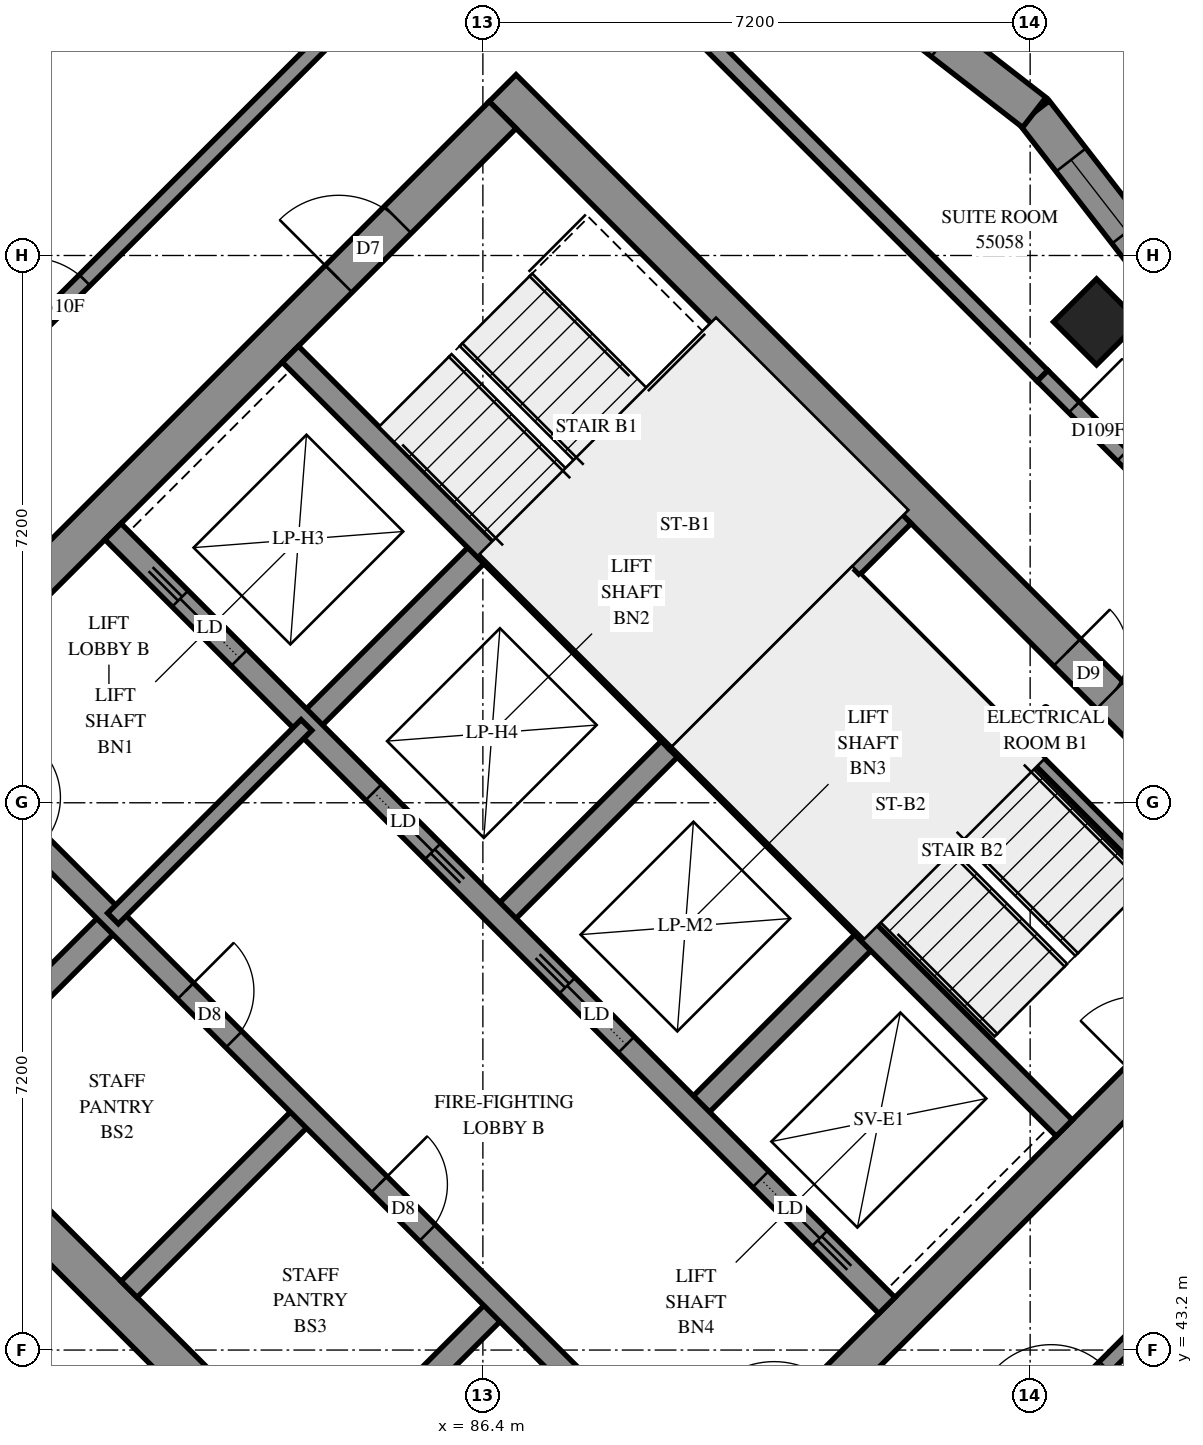
"""IFC4 building model, lengths in metres.
Left out: names, types, materials, properties, quantities, classifications, styles, units other than length and angle.
Written with IfcOpenShell. Run it as: python <this file> out.ifc"""

import sys

from ifc_helpers import new_model, si_unit, direction, frame, frame_2d, origin, origin_2d, place, context, subcontext, project, spatial, polyline, rectangle, outline, extrude, element, fill, save


model = new_model("IFC4")
c1 = context("Model", 3, precision=1e-05, world=origin(), true_north=direction((0.0, 1.0)))
c2 = subcontext(c1, "Body", "Model", "MODEL_VIEW")
j1 = project(units=[si_unit("LENGTHUNIT", "METRE"), si_unit("PLANEANGLEUNIT", "RADIAN")], contexts=[c1])
p1 = place(None, origin())
s1 = spatial("IfcSite", under=j1, at=p1, CompositionType="ELEMENT")
p2 = place(p1, origin())
s2 = spatial("IfcBuilding", under=s1, at=p2, CompositionType="ELEMENT")
p3 = place(p2, frame((0.0, 0.0, 203.2)))
s3 = spatial("IfcBuildingStorey", under=s2, at=p3, CompositionType="ELEMENT", Elevation=203.2)
p4 = place(p3, frame((94.474, 56.727, 0.0), z_axis=(0.0, 0.0, 1.0), x_axis=(0.7071067812, -0.7071067812, 0.0)))
e1 = element("IfcColumn", 1, at=p4, inside=s3, PredefinedType="COLUMN", context=c2, shape_type="SweptSolid", body=[
    extrude(rectangle(XDim=0.8, YDim=0.8, at=origin_2d()), origin(), (0.0, 0.0, 1.0), 3.1),
])
p5 = place(p3, frame((76.124, 49.267, -0.3), z_axis=(0.0, 0.0, 1.0), x_axis=(0.7071067812, -0.7071067812, 0.0)))
e2 = element("IfcWall", 2, at=p5, inside=s3, PredefinedType="SHEAR", context=c2, shape_type="SweptSolid", body=[
    extrude(rectangle(XDim=15.4, YDim=0.5, at=frame_2d((7.7, 0.0))), origin(), (0.0, 0.0, 1.0), 2.7),
])
p6 = place(p3, frame((86.66, 59.802, -0.3), z_axis=(0.0, 0.0, 1.0), x_axis=(0.7071067812, -0.7071067812, 0.0)))
e3 = element("IfcWall", 3, at=p6, inside=s3, PredefinedType="SHEAR", context=c2, shape_type="SweptSolid", body=[
    extrude(rectangle(XDim=15.4, YDim=0.5, at=frame_2d((7.7, 0.0))), origin(), (0.0, 0.0, 1.0), 2.7),
])
p7 = place(p6, frame((10.5, 0.0, 0.3)))
e4 = element("IfcOpeningElement", 4, at=p7, cuts=e3, PredefinedType="OPENING", context=c2, shape_type="SweptSolid", body=[
    extrude(rectangle(XDim=0.8, YDim=2.1, at=frame_2d((0.4, 1.05))), frame((0.0, 0.26, 0.0), z_axis=(0.0, -1.0, 0.0), x_axis=(1.0, 0.0, 0.0)), (0.0, 0.0, 1.0), 0.52),
])
p8 = place(p3, frame((76.478, 49.267, -0.3), z_axis=(0.0, 0.0, 1.0), x_axis=(0.7071067812, 0.7071067812, 0.0)))
e5 = element("IfcWall", 5, at=p8, inside=s3, PredefinedType="SHEAR", context=c2, shape_type="SweptSolid", body=[
    extrude(rectangle(XDim=14.4, YDim=0.5, at=frame_2d((7.2, 0.0))), origin(), (0.0, 0.0, 1.0), 2.7),
])
p9 = place(p8, frame((4.55, 0.0, 0.3)))
e6 = element("IfcOpeningElement", 6, at=p9, cuts=e5, PredefinedType="OPENING", context=c2, shape_type="SweptSolid", body=[
    extrude(rectangle(XDim=1.1, YDim=2.1, at=frame_2d((0.55, 1.05))), frame((0.0, 0.26, 0.0), z_axis=(0.0, -1.0, 0.0), x_axis=(1.0, 0.0, 0.0)), (0.0, 0.0, 1.0), 0.52),
])
p10 = place(p8, frame((11.35, 0.0, 0.3)))
e7 = element("IfcOpeningElement", 7, at=p10, cuts=e5, PredefinedType="OPENING", context=c2, shape_type="SweptSolid", body=[
    extrude(rectangle(XDim=1.1, YDim=2.1, at=frame_2d((0.55, 1.05))), frame((0.0, 0.26, 0.0), z_axis=(0.0, -1.0, 0.0), x_axis=(1.0, 0.0, 0.0)), (0.0, 0.0, 1.0), 0.52),
])
p11 = place(p3, frame((87.013, 38.731, -0.3), z_axis=(0.0, 0.0, 1.0), x_axis=(0.7071067812, 0.7071067812, 0.0)))
e8 = element("IfcWall", 8, at=p11, inside=s3, PredefinedType="SHEAR", context=c2, shape_type="SweptSolid", body=[
    extrude(rectangle(XDim=14.4, YDim=0.5, at=frame_2d((7.2, 0.0))), origin(), (0.0, 0.0, 1.0), 2.7),
])
p12 = place(p11, frame((4.55, 0.0, 0.3)))
e9 = element("IfcOpeningElement", 9, at=p12, cuts=e8, PredefinedType="OPENING", context=c2, shape_type="SweptSolid", body=[
    extrude(rectangle(XDim=1.1, YDim=2.1, at=frame_2d((0.55, 1.05))), frame((0.0, 0.26, 0.0), z_axis=(0.0, -1.0, 0.0), x_axis=(1.0, 0.0, 0.0)), (0.0, 0.0, 1.0), 0.52),
])
p13 = place(p11, frame((11.35, 0.0, 0.3)))
e10 = element("IfcOpeningElement", 10, at=p13, cuts=e8, PredefinedType="OPENING", context=c2, shape_type="SweptSolid", body=[
    extrude(rectangle(XDim=1.1, YDim=2.1, at=frame_2d((0.55, 1.05))), frame((0.0, 0.26, 0.0), z_axis=(0.0, -1.0, 0.0), x_axis=(1.0, 0.0, 0.0)), (0.0, 0.0, 1.0), 0.52),
])
for number, where, z_axis, x_axis in (
    (11, (79.2, 46.544, 0.0), (0.0, 0.0, 1.0), (0.707, 0.707, 0.0)),
    (12, (84.079, 51.423, 0.0), (0.0, 0.0, 1.0), (0.707, 0.707, 0.0)),
):
    element("IfcWall", number, at=place(p3, frame(where, z_axis=z_axis, x_axis=x_axis)), inside=s3, PredefinedType="SOLIDWALL", context=c2, shape_type="SweptSolid", body=[
        extrude(rectangle(XDim=3.3, YDim=0.3, at=frame_2d((1.65, 0.0))), origin(), (0.0, 0.0, 1.0), 3.1),
    ])
p14 = place(p3, frame((81.746, 43.999, 0.0), z_axis=(0.0, 0.0, 1.0), x_axis=(0.7071067812, 0.7071067812, 0.0)))
e13 = element("IfcWall", 13, at=p14, inside=s3, PredefinedType="SOLIDWALL", context=c2, shape_type="SweptSolid", body=[
    extrude(rectangle(XDim=3.3, YDim=0.3, at=frame_2d((1.65, 0.0))), origin(), (0.0, 0.0, 1.0), 3.1),
])
p15 = place(p3, frame((86.625, 48.878, 0.0), z_axis=(0.0, 0.0, 1.0), x_axis=(0.7071067812, 0.7071067812, 0.0)))
e14 = element("IfcWall", 14, at=p15, inside=s3, PredefinedType="SOLIDWALL", context=c2, shape_type="SweptSolid", body=[
    extrude(rectangle(XDim=3.3, YDim=0.3, at=frame_2d((1.65, 0.0))), origin(), (0.0, 0.0, 1.0), 3.1),
])
p16 = place(p3, frame((84.291, 41.453, 0.0), z_axis=(0.0, 0.0, 1.0), x_axis=(0.7071067812, 0.7071067812, 0.0)))
e15 = element("IfcWall", 15, at=p16, inside=s3, PredefinedType="SOLIDWALL", context=c2, shape_type="SweptSolid", body=[
    extrude(rectangle(XDim=3.3, YDim=0.3, at=frame_2d((1.65, 0.0))), origin(), (0.0, 0.0, 1.0), 3.1),
])
p17 = place(p3, frame((89.17, 46.332, 0.0), z_axis=(0.0, 0.0, 1.0), x_axis=(0.7071067812, 0.7071067812, 0.0)))
e16 = element("IfcWall", 16, at=p17, inside=s3, PredefinedType="SOLIDWALL", context=c2, shape_type="SweptSolid", body=[
    extrude(rectangle(XDim=3.3, YDim=0.3, at=frame_2d((1.65, 0.0))), origin(), (0.0, 0.0, 1.0), 3.1),
])
p18 = place(p3, frame((78.988, 51.423, 0.0), z_axis=(0.0, 0.0, 1.0), x_axis=(0.7071067812, -0.7071067812, 0.0)))
e17 = element("IfcWall", 17, at=p18, inside=s3, PredefinedType="SOLIDWALL", context=c2, shape_type="SweptSolid", body=[
    extrude(rectangle(XDim=14.4, YDim=0.3, at=frame_2d((7.2, 0.0))), origin(), (0.0, 0.0, 1.0), 3.1),
])
p19 = place(p18, frame((1.35, 0.0, 0.0)))
e18 = element("IfcOpeningElement", 18, at=p19, cuts=e17, PredefinedType="OPENING", context=c2, shape_type="SweptSolid", body=[
    extrude(rectangle(XDim=0.9, YDim=2.1, at=frame_2d((0.45, 1.05))), frame((0.0, 0.16, 0.0), z_axis=(0.0, -1.0, 0.0), x_axis=(1.0, 0.0, 0.0)), (0.0, 0.0, 1.0), 0.32),
])
p20 = place(p18, frame((4.95, 0.0, 0.0)))
e19 = element("IfcOpeningElement", 19, at=p20, cuts=e17, PredefinedType="OPENING", context=c2, shape_type="SweptSolid", body=[
    extrude(rectangle(XDim=0.9, YDim=2.1, at=frame_2d((0.45, 1.05))), frame((0.0, 0.16, 0.0), z_axis=(0.0, -1.0, 0.0), x_axis=(1.0, 0.0, 0.0)), (0.0, 0.0, 1.0), 0.32),
])
p21 = place(p18, frame((8.55, 0.0, 0.0)))
e20 = element("IfcOpeningElement", 20, at=p21, cuts=e17, PredefinedType="OPENING", context=c2, shape_type="SweptSolid", body=[
    extrude(rectangle(XDim=0.9, YDim=2.1, at=frame_2d((0.45, 1.05))), frame((0.0, 0.16, 0.0), z_axis=(0.0, -1.0, 0.0), x_axis=(1.0, 0.0, 0.0)), (0.0, 0.0, 1.0), 0.32),
])
p22 = place(p18, frame((12.05, 0.0, 0.0)))
e21 = element("IfcOpeningElement", 21, at=p22, cuts=e17, PredefinedType="OPENING", context=c2, shape_type="SweptSolid", body=[
    extrude(rectangle(XDim=1.1, YDim=2.1, at=frame_2d((0.55, 1.05))), frame((0.0, 0.16, 0.0), z_axis=(0.0, -1.0, 0.0), x_axis=(1.0, 0.0, 0.0)), (0.0, 0.0, 1.0), 0.32),
])
p23 = place(p3, frame((81.534, 53.969, 0.0), z_axis=(0.0, 0.0, 1.0), x_axis=(0.707103309, -0.7071102534, 0.0)))
e22 = element("IfcWall", 22, at=p23, inside=s3, PredefinedType="SOLIDWALL", context=c2, shape_type="SweptSolid", body=[
    extrude(rectangle(XDim=14.4, YDim=0.3, at=frame_2d((7.2, 0.0))), origin(), (0.0, 0.0, 1.0), 3.1),
])
p24 = place(p23, frame((1.25, 0.0, 0.0)))
e23 = element("IfcOpeningElement", 23, at=p24, cuts=e22, PredefinedType="OPENING", context=c2, shape_type="SweptSolid", body=[
    extrude(rectangle(XDim=1.1, YDim=2.1, at=frame_2d((0.55, 1.05))), frame((0.0, 0.16, 0.0), z_axis=(0.0, -1.0, 0.0), x_axis=(1.0, 0.0, 0.0)), (0.0, 0.0, 1.0), 0.32),
])
p25 = place(p23, frame((4.85, 0.0, 0.0)))
e24 = element("IfcOpeningElement", 24, at=p25, cuts=e22, PredefinedType="OPENING", context=c2, shape_type="SweptSolid", body=[
    extrude(rectangle(XDim=1.1, YDim=2.1, at=frame_2d((0.55, 1.05))), frame((0.0, 0.16, 0.0), z_axis=(0.0, -1.0, 0.0), x_axis=(1.0, 0.0, 0.0)), (0.0, 0.0, 1.0), 0.32),
])
p26 = place(p23, frame((8.45, 0.0, 0.0)))
e25 = element("IfcOpeningElement", 25, at=p26, cuts=e22, PredefinedType="OPENING", context=c2, shape_type="SweptSolid", body=[
    extrude(rectangle(XDim=1.1, YDim=2.1, at=frame_2d((0.55, 1.05))), frame((0.0, 0.16, 0.0), z_axis=(0.0, -1.0, 0.0), x_axis=(1.0, 0.0, 0.0)), (0.0, 0.0, 1.0), 0.32),
])
p27 = place(p23, frame((12.05, 0.0, 0.0)))
e26 = element("IfcOpeningElement", 26, at=p27, cuts=e22, PredefinedType="OPENING", context=c2, shape_type="SweptSolid", body=[
    extrude(rectangle(XDim=1.1, YDim=2.1, at=frame_2d((0.55, 1.05))), frame((0.0, 0.16, 0.0), z_axis=(0.0, -1.0, 0.0), x_axis=(1.0, 0.0, 0.0)), (0.0, 0.0, 1.0), 0.32),
])
for number, where, z_axis, x_axis in (
    (27, (83.867, 56.302, 0.0), (0.0, 0.0, 1.0), (0.707, -0.707, 0.0)),
    (28, (88.958, 51.211, 0.0), (0.0, 0.0, 1.0), (0.707, -0.707, 0.0)),
):
    element("IfcWall", number, at=place(p3, frame(where, z_axis=z_axis, x_axis=x_axis)), inside=s3, PredefinedType="SOLIDWALL", context=c2, shape_type="SweptSolid", body=[
        extrude(rectangle(XDim=7.2, YDim=0.3, at=frame_2d((3.6, 0.0))), origin(), (0.0, 0.0, 1.0), 3.1),
    ])
p28 = place(p3, frame((88.958, 51.211, 0.0), z_axis=(0.0, 0.0, 1.0), x_axis=(0.7071067812, 0.7071067812, 0.0)))
e29 = element("IfcWall", 29, at=p28, inside=s3, PredefinedType="SOLIDWALL", context=c2, shape_type="SweptSolid", body=[
    extrude(rectangle(XDim=4.2, YDim=0.3, at=frame_2d((2.1, 0.0))), origin(), (0.0, 0.0, 1.0), 3.1),
])
p29 = place(p3, frame((95.712, 56.828, 0.0), z_axis=(0.0, 0.0, 1.0), x_axis=(-0.6128887822, 0.7901691849, 0.0)))
e30 = element("IfcWall", 30, at=p29, inside=s3, PredefinedType="SOLIDWALL", context=c2, shape_type="SweptSolid", body=[
    extrude(outline(polyline([(0.032, -0.25), (3.39, -0.25), (3.327, 0.25), (-0.032, 0.25), (0.032, -0.25)])), origin(), (0.0, 0.0, 1.0), 3.1),
])
p30 = place(p29, frame((1.369, 0.0, 0.45)))
e31 = element("IfcOpeningElement", 31, at=p30, cuts=e30, PredefinedType="OPENING", context=c2, shape_type="SweptSolid", body=[
    extrude(rectangle(XDim=1.2, YDim=2.5, at=frame_2d((0.6, 1.25))), frame((0.0, 0.26, 0.0), z_axis=(0.0, -1.0, 0.0), x_axis=(1.0, 0.0, 0.0)), (0.0, 0.0, 1.0), 0.52),
])
p31 = place(p3, frame((93.654, 59.482, 0.0), z_axis=(0.0, 0.0, 1.0), x_axis=(-0.7901691849, 0.6128887822, 0.0)))
e32 = element("IfcWall", 32, at=p31, inside=s3, PredefinedType="SOLIDWALL", context=c2, shape_type="SweptSolid", body=[
    extrude(outline(polyline([(-0.032, -0.25), (3.327, -0.25), (3.39, 0.25), (0.032, 0.25), (-0.032, -0.25)])), origin(), (0.0, 0.0, 1.0), 3.1),
])
p32 = place(p31, frame((1.52, 0.0, 0.45)))
e33 = element("IfcOpeningElement", 33, at=p32, cuts=e32, PredefinedType="OPENING", context=c2, shape_type="SweptSolid", body=[
    extrude(rectangle(XDim=1.2, YDim=2.5, at=frame_2d((0.6, 1.25))), frame((0.0, 0.26, 0.0), z_axis=(0.0, -1.0, 0.0), x_axis=(1.0, 0.0, 0.0)), (0.0, 0.0, 1.0), 0.52),
])
p33 = place(p3, frame((91.313, 53.354, 0.0), z_axis=(0.0, 0.0, 1.0), x_axis=(0.7071067812, -0.7071067812, 0.0)))
e34 = element("IfcWall", 34, at=p33, inside=s3, PredefinedType="PARTITIONING", context=c2, shape_type="SweptSolid", body=[
    extrude(rectangle(XDim=5.95, YDim=0.15, at=frame_2d((2.975, 0.0))), origin(), (0.0, 0.0, 1.0), 3.1),
])
p34 = place(p3, frame((81.534, 48.878, 0.0), z_axis=(0.0, 0.0, 1.0), x_axis=(0.707092892, 0.7071206701, 0.0)))
e35 = element("IfcWall", 35, at=p34, inside=s3, PredefinedType="PARTITIONING", context=c2, shape_type="SweptSolid", body=[
    extrude(rectangle(XDim=3.6, YDim=0.2, at=frame_2d((1.8, 0.0))), origin(), (0.0, 0.0, 1.0), 3.1),
])
p35 = place(p3, frame((93.695, 42.091, 0.0), z_axis=(0.0, 0.0, 1.0), x_axis=(0.7071067812, 0.7071067812, 0.0)))
e36 = element("IfcWall", 36, at=p35, inside=s3, PredefinedType="PARTITIONING", context=c2, shape_type="SweptSolid", body=[
    extrude(rectangle(XDim=9.899, YDim=0.2, at=frame_2d((4.95, 0.0))), origin(), (0.0, 0.0, 1.0), 3.1),
])
p36 = place(p35, frame((0.255, 0.0, 0.0)))
e37 = element("IfcOpeningElement", 37, at=p36, cuts=e36, PredefinedType="OPENING", context=c2, shape_type="SweptSolid", body=[
    extrude(rectangle(XDim=1.0, YDim=2.1, at=frame_2d((0.5, 1.05))), frame((0.0, 0.11, 0.0), z_axis=(0.0, -1.0, 0.0), x_axis=(1.0, 0.0, 0.0)), (0.0, 0.0, 1.0), 0.22),
])
p37 = place(p3, frame((79.837, 55.951, 0.0), z_axis=(0.0, 0.0, 1.0), x_axis=(0.7071067812, 0.7071067812, 0.0)))
e38 = element("IfcWall", 38, at=p37, inside=s3, PredefinedType="PARTITIONING", context=c2, shape_type="SweptSolid", body=[
    extrude(rectangle(XDim=9.897, YDim=0.2, at=frame_2d((4.948, 0.0))), origin(), (0.0, 0.0, 1.0), 3.1),
])
p38 = place(p37, frame((0.873, 0.0, 0.0)))
e39 = element("IfcOpeningElement", 39, at=p38, cuts=e38, PredefinedType="OPENING", context=c2, shape_type="SweptSolid", body=[
    extrude(rectangle(XDim=1.0, YDim=2.1, at=frame_2d((0.5, 1.05))), frame((0.0, 0.11, 0.0), z_axis=(0.0, -1.0, 0.0), x_axis=(1.0, 0.0, 0.0)), (0.0, 0.0, 1.0), 0.22),
])
p39 = place(p3, frame((86.835, 62.945, 0.0), z_axis=(0.0, 0.0, 1.0), x_axis=(0.7071067812, -0.7071067812, 0.0)))
e40 = element("IfcWall", 40, at=p39, inside=s3, PredefinedType="PARTITIONING", context=c2, shape_type="SweptSolid", body=[
    extrude(rectangle(XDim=9.798, YDim=0.2, at=frame_2d((4.899, 0.0))), origin(), (0.0, 0.0, 1.0), 3.1),
])
p40 = place(p3, frame((94.402, 41.382, 0.0), z_axis=(0.0, 0.0, 1.0), x_axis=(0.7072538072, 0.7069597246, 0.0)))
e41 = element("IfcWall", 41, at=p40, inside=s3, PredefinedType="PARTITIONING", context=c2, shape_type="SweptSolid", body=[
    extrude(rectangle(XDim=6.801, YDim=0.2, at=frame_2d((3.4, 0.0))), origin(), (0.0, 0.0, 1.0), 3.1),
])
p41 = place(p3, frame((93.763, 56.017, 0.0), z_axis=(0.0, 0.0, 1.0), x_axis=(0.7076620277, -0.7065510983, 0.0)))
e42 = element("IfcWall", 42, at=p41, inside=s3, PredefinedType="PARTITIONING", context=c2, shape_type="SweptSolid", body=[
    extrude(rectangle(XDim=1.8, YDim=0.2, at=frame_2d((0.9, 0.0))), origin(), (0.0, 0.0, 1.0), 3.1),
])
p42 = place(p41, frame((0.585, 0.0, 0.0)))
e43 = element("IfcOpeningElement", 43, at=p42, cuts=e42, PredefinedType="OPENING", context=c2, shape_type="SweptSolid", body=[
    extrude(rectangle(XDim=0.9, YDim=2.1, at=frame_2d((0.45, 1.05))), frame((0.0, 0.11, 0.0), z_axis=(0.0, -1.0, 0.0), x_axis=(1.0, 0.0, 0.0)), (0.0, 0.0, 1.0), 0.22),
])
p43 = place(p30, origin())
e44 = element("IfcWindow", 44, at=p43, inside=s3, PartitioningType="SINGLE_PANEL", PredefinedType="WINDOW", context=c2, shape_type="SweptSolid", body=[
    extrude(rectangle(XDim=1.2, YDim=2.5, at=frame_2d((0.6, 1.25))), frame((0.0, 0.18, 0.0), z_axis=(0.0, -1.0, 0.0), x_axis=(1.0, 0.0, 0.0)), (0.0, 0.0, 1.0), 0.06),
])
fill(e31, e44)
p44 = place(p32, origin())
e45 = element("IfcWindow", 45, at=p44, inside=s3, PartitioningType="SINGLE_PANEL", PredefinedType="WINDOW", context=c2, shape_type="SweptSolid", body=[
    extrude(rectangle(XDim=1.2, YDim=2.5, at=frame_2d((0.6, 1.25))), frame((0.0, 0.18, 0.0), z_axis=(0.0, -1.0, 0.0), x_axis=(1.0, 0.0, 0.0)), (0.0, 0.0, 1.0), 0.06),
])
fill(e33, e45)
p45 = place(p7, origin())
e46 = element("IfcDoor", 46, at=p45, inside=s3, OperationType="SINGLE_SWING_RIGHT", PredefinedType="DOOR", context=c2, shape_type="SweptSolid", body=[
    extrude(rectangle(XDim=0.8, YDim=2.1, at=frame_2d((0.4, 1.05))), frame((0.0, 0.025, 0.0), z_axis=(0.0, -1.0, 0.0), x_axis=(1.0, 0.0, 0.0)), (0.0, 0.0, 1.0), 0.05),
])
fill(e4, e46)
p46 = place(p10, origin())
e47 = element("IfcDoor", 47, at=p46, inside=s3, OperationType="SINGLE_SWING_LEFT", PredefinedType="DOOR", context=c2, shape_type="SweptSolid", body=[
    extrude(rectangle(XDim=1.1, YDim=2.1, at=frame_2d((0.55, 1.05))), frame((0.0, 0.025, 0.0), z_axis=(0.0, -1.0, 0.0), x_axis=(1.0, 0.0, 0.0)), (0.0, 0.0, 1.0), 0.05),
])
fill(e7, e47)
p47 = place(p20, origin())
e48 = element("IfcDoor", 48, at=p47, inside=s3, OperationType="SINGLE_SWING_LEFT", PredefinedType="DOOR", context=c2, shape_type="SweptSolid", body=[
    extrude(rectangle(XDim=0.9, YDim=2.1, at=frame_2d((0.45, 1.05))), frame((0.0, 0.025, 0.0), z_axis=(0.0, -1.0, 0.0), x_axis=(1.0, 0.0, 0.0)), (0.0, 0.0, 1.0), 0.05),
])
fill(e19, e48)
p48 = place(p21, origin())
e49 = element("IfcDoor", 49, at=p48, inside=s3, OperationType="SINGLE_SWING_LEFT", PredefinedType="DOOR", context=c2, shape_type="SweptSolid", body=[
    extrude(rectangle(XDim=0.9, YDim=2.1, at=frame_2d((0.45, 1.05))), frame((0.0, 0.025, 0.0), z_axis=(0.0, -1.0, 0.0), x_axis=(1.0, 0.0, 0.0)), (0.0, 0.0, 1.0), 0.05),
])
fill(e20, e49)
p49 = place(p24, origin())
e50 = element("IfcDoor", 50, at=p49, inside=s3, OperationType="SLIDING_TO_LEFT", PredefinedType="DOOR", context=c2, shape_type="SweptSolid", body=[
    extrude(rectangle(XDim=1.1, YDim=2.1, at=frame_2d((0.55, 1.05))), frame((0.0, 0.025, 0.0), z_axis=(0.0, -1.0, 0.0), x_axis=(1.0, 0.0, 0.0)), (0.0, 0.0, 1.0), 0.05),
])
fill(e23, e50)
p50 = place(p25, origin())
e51 = element("IfcDoor", 51, at=p50, inside=s3, OperationType="SLIDING_TO_RIGHT", PredefinedType="DOOR", context=c2, shape_type="SweptSolid", body=[
    extrude(rectangle(XDim=1.1, YDim=2.1, at=frame_2d((0.55, 1.05))), frame((0.0, 0.025, 0.0), z_axis=(0.0, -1.0, 0.0), x_axis=(1.0, 0.0, 0.0)), (0.0, 0.0, 1.0), 0.05),
])
fill(e24, e51)
p51 = place(p26, origin())
e52 = element("IfcDoor", 52, at=p51, inside=s3, OperationType="SLIDING_TO_LEFT", PredefinedType="DOOR", context=c2, shape_type="SweptSolid", body=[
    extrude(rectangle(XDim=1.1, YDim=2.1, at=frame_2d((0.55, 1.05))), frame((0.0, 0.025, 0.0), z_axis=(0.0, -1.0, 0.0), x_axis=(1.0, 0.0, 0.0)), (0.0, 0.0, 1.0), 0.05),
])
fill(e25, e52)
p52 = place(p27, origin())
e53 = element("IfcDoor", 53, at=p52, inside=s3, OperationType="SLIDING_TO_RIGHT", PredefinedType="DOOR", context=c2, shape_type="SweptSolid", body=[
    extrude(rectangle(XDim=1.1, YDim=2.1, at=frame_2d((0.55, 1.05))), frame((0.0, 0.025, 0.0), z_axis=(0.0, -1.0, 0.0), x_axis=(1.0, 0.0, 0.0)), (0.0, 0.0, 1.0), 0.05),
])
fill(e26, e53)
p53 = place(p38, origin())
e54 = element("IfcDoor", 54, at=p53, inside=s3, OperationType="SINGLE_SWING_RIGHT", PredefinedType="DOOR", context=c2, shape_type="SweptSolid", body=[
    extrude(rectangle(XDim=1.0, YDim=2.1, at=frame_2d((0.5, 1.05))), frame((0.0, 0.025, 0.0), z_axis=(0.0, -1.0, 0.0), x_axis=(1.0, 0.0, 0.0)), (0.0, 0.0, 1.0), 0.05),
])
fill(e39, e54)
p54 = place(p42, origin())
e55 = element("IfcDoor", 55, at=p54, inside=s3, OperationType="SINGLE_SWING_LEFT", PredefinedType="DOOR", context=c2, shape_type="SweptSolid", body=[
    extrude(rectangle(XDim=0.9, YDim=2.1, at=frame_2d((0.45, 1.05))), frame((0.0, 0.025, 0.0), z_axis=(0.0, -1.0, 0.0), x_axis=(1.0, 0.0, 0.0)), (0.0, 0.0, 1.0), 0.05),
])
fill(e43, e55)
save(model, sys.argv[1])
